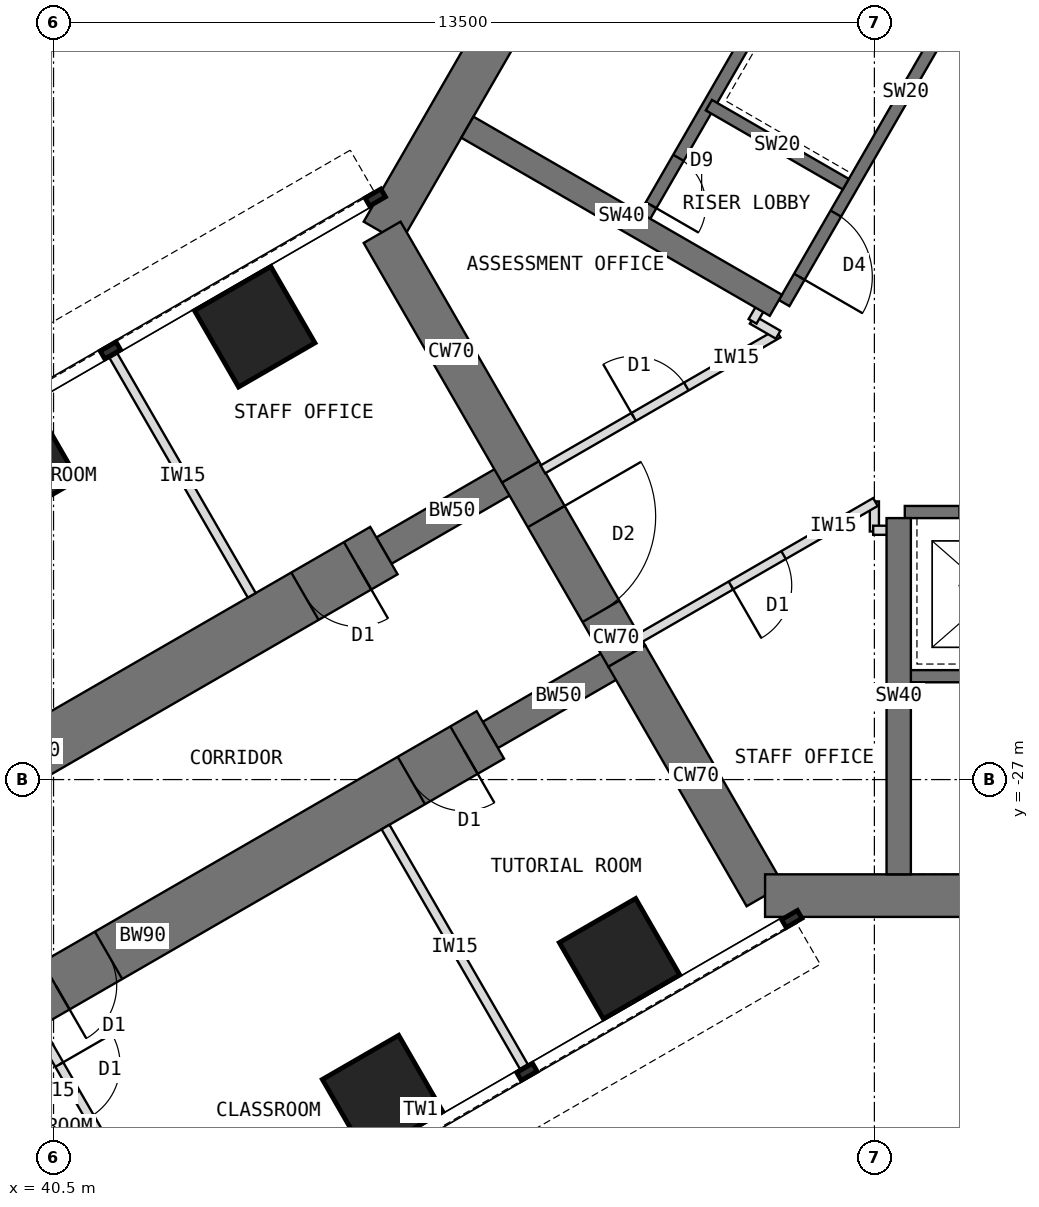
"""IFC4 building model, lengths in metres.
Left out: names, types, materials, properties, quantities, classifications, styles, units other than length and angle.
Written with IfcOpenShell. Run it as: python <this file> out.ifc"""

import sys

from ifc_helpers import new_model, si_unit, direction, frame, frame_2d, origin, origin_2d, place, context, subcontext, project, spatial, rectangle, extrude, element, fill, save


model = new_model("IFC4")
c1 = context("Model", 3, precision=1e-05, world=origin(), true_north=direction((0.0, 1.0)))
c2 = subcontext(c1, "Body", "Model", "MODEL_VIEW")
j1 = project(units=[si_unit("LENGTHUNIT", "METRE"), si_unit("PLANEANGLEUNIT", "RADIAN")], contexts=[c1])
p1 = place(None, origin())
s1 = spatial("IfcSite", under=j1, at=p1, CompositionType="ELEMENT")
p2 = place(p1, origin())
s2 = spatial("IfcBuilding", under=s1, at=p2, CompositionType="ELEMENT")
p3 = place(p2, frame((0.0, 0.0, 52.5)))
s3 = spatial("IfcBuildingStorey", under=s2, at=p3, CompositionType="ELEMENT", Elevation=52.5)
p4 = place(p3, frame((52.202, -7.092, 0.0), z_axis=(0.0, 0.0, 1.0), x_axis=(-0.500005998175, -0.866021940709, 0.0)))
e1 = element("IfcWall", 1, at=p4, inside=s3, PredefinedType="SHEAR", context=c2, shape_type="SweptSolid", body=[
    extrude(rectangle(XDim=12.596, YDim=0.7, at=frame_2d((6.298, 0.0))), origin(), (0.0, 0.0, 1.0), 4.0),
])
p5 = place(p3, frame((45.904, -18.0, 0.0), z_axis=(0.0, 0.0, 1.0), x_axis=(0.500024481964, -0.866011268655, 0.0)))
e2 = element("IfcWall", 2, at=p5, inside=s3, PredefinedType="SHEAR", context=c2, shape_type="SweptSolid", body=[
    extrude(rectangle(XDim=4.548, YDim=0.7, at=frame_2d((2.274, 0.0))), origin(), (0.0, 0.0, 1.0), 4.0),
])
p6 = place(p3, frame((48.178, -21.939, 0.0), z_axis=(0.0, 0.0, 1.0), x_axis=(0.500010275428, -0.866019471182, 0.0)))
e3 = element("IfcWall", 3, at=p6, inside=s3, PredefinedType="SHEAR", context=c2, shape_type="SweptSolid", body=[
    extrude(rectangle(XDim=3.5, YDim=0.7, at=frame_2d((1.75, 0.0))), origin(), (0.0, 0.0, 1.0), 4.0),
])
p7 = place(p6, frame((0.85, 0.0, 0.0)))
e4 = element("IfcOpeningElement", 4, at=p7, cuts=e3, PredefinedType="OPENING", context=c2, shape_type="SweptSolid", body=[
    extrude(rectangle(XDim=1.8, YDim=2.1, at=frame_2d((0.9, 1.05))), frame((0.0, 0.36, 0.0), z_axis=(0.0, -1.0, 0.0), x_axis=(1.0, 0.0, 0.0)), (0.0, 0.0, 1.0), 0.72),
])
p8 = place(p3, frame((49.928, -24.97, 0.0), z_axis=(0.0, 0.0, 1.0), x_axis=(0.499984222037, -0.866034513004, 0.0)))
e5 = element("IfcWall", 5, at=p8, inside=s3, PredefinedType="SHEAR", context=c2, shape_type="SweptSolid", body=[
    extrude(rectangle(XDim=4.548, YDim=0.7, at=frame_2d((2.274, 0.0))), origin(), (0.0, 0.0, 1.0), 4.0),
])
p9 = place(p3, frame((52.202, -28.908, 0.0), z_axis=(0.0, 0.0, 1.0), x_axis=(1.0, 0.0, 0.0)))
e6 = element("IfcWall", 6, at=p9, inside=s3, PredefinedType="SHEAR", context=c2, shape_type="SweptSolid", body=[
    extrude(rectangle(XDim=12.596, YDim=0.7, at=frame_2d((6.298, 0.0))), origin(), (0.0, 0.0, 1.0), 4.0),
])
p10 = place(p3, frame((49.928, -24.97, 0.0), z_axis=(0.0, 0.0, 1.0), x_axis=(-0.866031863473, -0.499988811324, 0.0)))
e7 = element("IfcWall", 7, at=p10, inside=s3, PredefinedType="SHEAR", context=c2, shape_type="SweptSolid", body=[
    extrude(rectangle(XDim=2.592, YDim=0.5, at=frame_2d((1.296, 0.0))), origin(), (0.0, 0.0, 1.0), 4.0),
])
p11 = place(p3, frame((47.684, -26.266, 0.0), z_axis=(0.0, 0.0, 1.0), x_axis=(-0.866027579429, -0.499996231654, 0.0)))
e8 = element("IfcWall", 8, at=p11, inside=s3, PredefinedType="SHEAR", context=c2, shape_type="SweptSolid", body=[
    extrude(rectangle(XDim=13.2, YDim=0.9, at=frame_2d((6.6, 0.0))), origin(), (0.0, 0.0, 1.0), 4.0),
])
p12 = place(p11, frame((0.5, 0.0, 0.0)))
e9 = element("IfcOpeningElement", 9, at=p12, cuts=e8, PredefinedType="OPENING", context=c2, shape_type="SweptSolid", body=[
    extrude(rectangle(XDim=1.0, YDim=2.1, at=frame_2d((0.5, 1.05))), frame((0.0, 0.46, 0.0), z_axis=(0.0, -1.0, 0.0), x_axis=(1.0, 0.0, 0.0)), (0.0, 0.0, 1.0), 0.92),
])
p13 = place(p11, frame((7.25, 0.0, 0.0)))
e10 = element("IfcOpeningElement", 10, at=p13, cuts=e8, PredefinedType="OPENING", context=c2, shape_type="SweptSolid", body=[
    extrude(rectangle(XDim=1.0, YDim=2.1, at=frame_2d((0.5, 1.05))), frame((0.0, 0.46, 0.0), z_axis=(0.0, -1.0, 0.0), x_axis=(1.0, 0.0, 0.0)), (0.0, 0.0, 1.0), 0.92),
])
p14 = place(p3, frame((48.178, -21.939, 0.0), z_axis=(0.0, 0.0, 1.0), x_axis=(-0.866072649678, -0.499918158782, 0.0)))
e11 = element("IfcWall", 11, at=p14, inside=s3, PredefinedType="SHEAR", context=c2, shape_type="SweptSolid", body=[
    extrude(rectangle(XDim=2.592, YDim=0.5, at=frame_2d((1.296, 0.0))), origin(), (0.0, 0.0, 1.0), 4.0),
])
p15 = place(p3, frame((45.934, -23.234, 0.0), z_axis=(0.0, 0.0, 1.0), x_axis=(-0.866019570528, -0.500010103361, 0.0)))
e12 = element("IfcWall", 12, at=p15, inside=s3, PredefinedType="SHEAR", context=c2, shape_type="SweptSolid", body=[
    extrude(rectangle(XDim=13.2, YDim=0.9, at=frame_2d((6.6, 0.0))), origin(), (0.0, 0.0, 1.0), 4.0),
])
p16 = place(p15, frame((0.5, 0.0, 0.0)))
e13 = element("IfcOpeningElement", 13, at=p16, cuts=e12, PredefinedType="OPENING", context=c2, shape_type="SweptSolid", body=[
    extrude(rectangle(XDim=1.0, YDim=2.1, at=frame_2d((0.5, 1.05))), frame((0.0, 0.46, 0.0), z_axis=(0.0, -1.0, 0.0), x_axis=(1.0, 0.0, 0.0)), (0.0, 0.0, 1.0), 0.92),
])
p17 = place(p15, frame((7.25, 0.0, 0.0)))
e14 = element("IfcOpeningElement", 14, at=p17, cuts=e12, PredefinedType="OPENING", context=c2, shape_type="SweptSolid", body=[
    extrude(rectangle(XDim=1.0, YDim=2.1, at=frame_2d((0.5, 1.05))), frame((0.0, 0.46, 0.0), z_axis=(0.0, -1.0, 0.0), x_axis=(1.0, 0.0, 0.0)), (0.0, 0.0, 1.0), 0.92),
])
for number, where, z_axis, x_axis in (
    (15, (49.809, -29.946, 0.0), (0.0, 0.0, 1.0), (0.866, 0.5, 0.0)),
    (16, (43.809, -19.554, 0.0), (0.0, 0.0, 1.0), (0.866, 0.5, 0.0)),
    (17, (45.912, -32.196, 0.0), (0.0, 0.0, 1.0), (0.866, 0.5, 0.0)),
    (18, (39.912, -21.804, 0.0), (0.0, 0.0, 1.0), (0.866, 0.5, 0.0)),
):
    element("IfcColumn", number, at=place(p3, frame(where, z_axis=z_axis, x_axis=x_axis)), inside=s3, PredefinedType="COLUMN", context=c2, shape_type="SweptSolid", body=[
        extrude(rectangle(XDim=1.45, YDim=1.45, at=origin_2d()), origin(), (0.0, 0.0, 1.0), 4.0),
    ])
p18 = place(p3, frame((56.516, -12.236, 0.0), z_axis=(0.0, 0.0, 1.0), x_axis=(-0.49999894854, -0.866026010844, 0.0)))
e19 = element("IfcWall", 19, at=p18, inside=s3, PredefinedType="SHEAR", context=c2, shape_type="SweptSolid", body=[
    extrude(rectangle(XDim=8.0, YDim=0.2, at=frame_2d((4.0, 0.0))), origin(), (0.0, 0.0, 1.0), 4.0),
])
p19 = place(p18, frame((6.3, 0.0, 0.0)))
e20 = element("IfcOpeningElement", 20, at=p19, cuts=e19, PredefinedType="OPENING", context=c2, shape_type="SweptSolid", body=[
    extrude(rectangle(XDim=1.2, YDim=2.1, at=frame_2d((0.6, 1.05))), frame((0.0, 0.11, 0.0), z_axis=(0.0, -1.0, 0.0), x_axis=(1.0, 0.0, 0.0)), (0.0, 0.0, 1.0), 0.22),
])
p20 = place(p3, frame((53.53, -17.209, 0.0), z_axis=(0.0, 0.0, 1.0), x_axis=(-0.866062058628, 0.499936506574, 0.0)))
e21 = element("IfcWall", 21, at=p20, inside=s3, PredefinedType="SHEAR", context=c2, shape_type="SweptSolid", body=[
    extrude(rectangle(XDim=2.6, YDim=0.2, at=frame_2d((1.3, 0.0))), origin(), (0.0, 0.0, 1.0), 4.0),
])
p21 = place(p3, frame((54.178, -10.886, 0.0), z_axis=(0.0, 0.0, 1.0), x_axis=(-0.49999894854, -0.866026010844, 0.0)))
e22 = element("IfcWall", 22, at=p21, inside=s3, PredefinedType="SHEAR", context=c2, shape_type="SweptSolid", body=[
    extrude(rectangle(XDim=8.0, YDim=0.2, at=frame_2d((4.0, 0.0))), origin(), (0.0, 0.0, 1.0), 4.0),
])
p22 = place(p21, frame((6.8, 0.0, 0.0)))
e23 = element("IfcOpeningElement", 23, at=p22, cuts=e22, PredefinedType="OPENING", context=c2, shape_type="SweptSolid", body=[
    extrude(rectangle(XDim=0.9, YDim=2.1, at=frame_2d((0.45, 1.05))), frame((0.0, 0.11, 0.0), z_axis=(0.0, -1.0, 0.0), x_axis=(1.0, 0.0, 0.0)), (0.0, 0.0, 1.0), 0.22),
])
p23 = place(p3, frame((52.38, -19.201, 0.0), z_axis=(0.0, 0.0, 1.0), x_axis=(-0.866023886965, 0.500002627198, 0.0)))
e24 = element("IfcWall", 24, at=p23, inside=s3, PredefinedType="SHEAR", context=c2, shape_type="SweptSolid", body=[
    extrude(rectangle(XDim=5.858, YDim=0.4, at=frame_2d((2.929, 0.0))), origin(), (0.0, 0.0, 1.0), 4.0),
])
p24 = place(p3, frame((54.5, -22.6, 0.0), z_axis=(0.0, 0.0, 1.0), x_axis=(1.0, 0.0, 0.0)))
e25 = element("IfcWall", 25, at=p24, inside=s3, PredefinedType="SHEAR", context=c2, shape_type="SweptSolid", body=[
    extrude(rectangle(XDim=8.0, YDim=0.2, at=frame_2d((4.0, 0.0))), origin(), (0.0, 0.0, 1.0), 4.0),
])
p25 = place(p24, frame((6.3, 0.0, 0.0)))
e26 = element("IfcOpeningElement", 26, at=p25, cuts=e25, PredefinedType="OPENING", context=c2, shape_type="SweptSolid", body=[
    extrude(rectangle(XDim=1.2, YDim=2.1, at=frame_2d((0.6, 1.05))), frame((0.0, 0.11, 0.0), z_axis=(0.0, -1.0, 0.0), x_axis=(1.0, 0.0, 0.0)), (0.0, 0.0, 1.0), 0.22),
])
p26 = place(p24, frame((0.9, 0.0, 0.0)))
e27 = element("IfcOpeningElement", 27, at=p26, cuts=e25, PredefinedType="OPENING", context=c2, shape_type="SweptSolid", body=[
    extrude(rectangle(XDim=1.1, YDim=2.2, at=frame_2d((0.55, 1.1))), frame((0.0, 0.11, 0.0), z_axis=(0.0, -1.0, 0.0), x_axis=(1.0, 0.0, 0.0)), (0.0, 0.0, 1.0), 0.22),
])
p27 = place(p3, frame((54.5, -25.3, 0.0), z_axis=(0.0, 0.0, 1.0), x_axis=(1.0, 0.0, 0.0)))
e28 = element("IfcWall", 28, at=p27, inside=s3, PredefinedType="SHEAR", context=c2, shape_type="SweptSolid", body=[
    extrude(rectangle(XDim=8.0, YDim=0.2, at=frame_2d((4.0, 0.0))), origin(), (0.0, 0.0, 1.0), 4.0),
])
p28 = place(p27, frame((6.7, 0.0, 0.0)))
e29 = element("IfcOpeningElement", 29, at=p28, cuts=e28, PredefinedType="OPENING", context=c2, shape_type="SweptSolid", body=[
    extrude(rectangle(XDim=1.1, YDim=2.1, at=frame_2d((0.55, 1.05))), frame((0.0, 0.11, 0.0), z_axis=(0.0, -1.0, 0.0), x_axis=(1.0, 0.0, 0.0)), (0.0, 0.0, 1.0), 0.22),
])
p29 = place(p3, frame((54.4, -22.7, 0.0), z_axis=(0.0, 0.0, 1.0), x_axis=(0.0, -1.0, 0.0)))
e30 = element("IfcWall", 30, at=p29, inside=s3, PredefinedType="SHEAR", context=c2, shape_type="SweptSolid", body=[
    extrude(rectangle(XDim=5.858, YDim=0.4, at=frame_2d((2.929, 0.0))), origin(), (0.0, 0.0, 1.0), 4.0),
])
p30 = place(p3, frame((45.96, -27.78, 0.0), z_axis=(0.0, 0.0, 1.0), x_axis=(0.499982560684, -0.866035472144, 0.0)))
e31 = element("IfcWall", 31, at=p30, inside=s3, PredefinedType="PARTITIONING", context=c2, shape_type="SweptSolid", body=[
    extrude(rectangle(XDim=4.55, YDim=0.15, at=frame_2d((2.275, 0.0))), origin(), (0.0, 0.0, 1.0), 3.8),
])
p31 = place(p3, frame((40.244, -31.08, 0.0), z_axis=(0.0, 0.0, 1.0), x_axis=(0.500001309137, -0.866024647952, 0.0)))
e32 = element("IfcWall", 32, at=p31, inside=s3, PredefinedType="PARTITIONING", context=c2, shape_type="SweptSolid", body=[
    extrude(rectangle(XDim=2.4, YDim=0.15, at=frame_2d((1.2, 0.0))), origin(), (0.0, 0.0, 1.0), 3.8),
])
p32 = place(p31, frame((0.7, 0.0, 0.0)))
e33 = element("IfcOpeningElement", 33, at=p32, cuts=e32, PredefinedType="OPENING", context=c2, shape_type="SweptSolid", body=[
    extrude(rectangle(XDim=1.0, YDim=2.1, at=frame_2d((0.5, 1.05))), frame((0.0, 0.085, 0.0), z_axis=(0.0, -1.0, 0.0), x_axis=(1.0, 0.0, 0.0)), (0.0, 0.0, 1.0), 0.17),
])
p33 = place(p3, frame((43.76, -23.97, 0.0), z_axis=(0.0, 0.0, 1.0), x_axis=(-0.499982560684, 0.866035472144, 0.0)))
e34 = element("IfcWall", 34, at=p33, inside=s3, PredefinedType="PARTITIONING", context=c2, shape_type="SweptSolid", body=[
    extrude(rectangle(XDim=4.55, YDim=0.15, at=frame_2d((2.275, 0.0))), origin(), (0.0, 0.0, 1.0), 3.8),
])
p34 = place(p3, frame((54.0, -22.92, 0.0), z_axis=(0.0, 0.0, 1.0), x_axis=(0.0, 1.0, 0.0)))
e35 = element("IfcWall", 35, at=p34, inside=s3, PredefinedType="PARTITIONING", context=c2, shape_type="SweptSolid", body=[
    extrude(rectangle(XDim=0.494, YDim=0.15, at=frame_2d((0.247, 0.0))), origin(), (0.0, 0.0, 1.0), 3.8),
])
p35 = place(p3, frame((54.017, -22.436, 0.0), z_axis=(0.0, 0.0, 1.0), x_axis=(-0.866015446554, -0.500017246033, 0.0)))
e36 = element("IfcWall", 36, at=p35, inside=s3, PredefinedType="PARTITIONING", context=c2, shape_type="SweptSolid", body=[
    extrude(rectangle(XDim=4.469, YDim=0.15, at=frame_2d((2.234, 0.0))), origin(), (0.0, 0.0, 1.0), 3.8),
])
p36 = place(p35, frame((1.744, 0.0, 0.0)))
e37 = element("IfcOpeningElement", 37, at=p36, cuts=e36, PredefinedType="OPENING", context=c2, shape_type="SweptSolid", body=[
    extrude(rectangle(XDim=1.0, YDim=2.1, at=frame_2d((0.5, 1.05))), frame((0.0, 0.085, 0.0), z_axis=(0.0, -1.0, 0.0), x_axis=(1.0, 0.0, 0.0)), (0.0, 0.0, 1.0), 0.17),
])
p37 = place(p3, frame((48.548, -21.898, 0.0), z_axis=(0.0, 0.0, 1.0), x_axis=(0.866025445582, 0.499999927604, 0.0)))
e38 = element("IfcWall", 38, at=p37, inside=s3, PredefinedType="PARTITIONING", context=c2, shape_type="SweptSolid", body=[
    extrude(rectangle(XDim=4.468, YDim=0.15, at=frame_2d((2.234, 0.0))), origin(), (0.0, 0.0, 1.0), 3.8),
])
p38 = place(p37, frame((1.724, 0.0, 0.0)))
e39 = element("IfcOpeningElement", 39, at=p38, cuts=e38, PredefinedType="OPENING", context=c2, shape_type="SweptSolid", body=[
    extrude(rectangle(XDim=1.0, YDim=2.1, at=frame_2d((0.5, 1.05))), frame((0.0, 0.085, 0.0), z_axis=(0.0, -1.0, 0.0), x_axis=(1.0, 0.0, 0.0)), (0.0, 0.0, 1.0), 0.17),
])
p39 = place(p3, frame((52.417, -19.684, 0.0), z_axis=(0.0, 0.0, 1.0), x_axis=(-0.865831790172, 0.50033519877, 0.0)))
e40 = element("IfcWall", 40, at=p39, inside=s3, PredefinedType="PARTITIONING", context=c2, shape_type="SweptSolid", body=[
    extrude(rectangle(XDim=0.494, YDim=0.15, at=frame_2d((0.247, 0.0))), origin(), (0.0, 0.0, 1.0), 3.8),
])
for number, where, z_axis, x_axis in (
    (41, (51.997, -19.464, 0.0), (0.0, 0.0, 1.0), (0.5, 0.866, 0.0)),
    (42, (54.41, -22.9, 0.0), (0.0, 0.0, 1.0), (-1.0, 0.0, 0.0)),
):
    element("IfcWall", number, at=place(p3, frame(where, z_axis=z_axis, x_axis=x_axis)), inside=s3, PredefinedType="PARTITIONING", context=c2, shape_type="SweptSolid", body=[
        extrude(rectangle(XDim=0.43, YDim=0.15, at=frame_2d((0.215, 0.0))), origin(), (0.0, 0.0, 1.0), 3.8),
    ])
p40 = place(p19, origin())
e43 = element("IfcDoor", 43, at=p40, inside=s3, OperationType="SINGLE_SWING_RIGHT", PredefinedType="DOOR", context=c2, shape_type="SweptSolid", body=[
    extrude(rectangle(XDim=1.2, YDim=2.1, at=frame_2d((0.6, 1.05))), frame((0.0, 0.025, 0.0), z_axis=(0.0, -1.0, 0.0), x_axis=(1.0, 0.0, 0.0)), (0.0, 0.0, 1.0), 0.05),
])
fill(e20, e43)
p41 = place(p22, origin())
e44 = element("IfcDoor", 44, at=p41, inside=s3, OperationType="SINGLE_SWING_RIGHT", PredefinedType="DOOR", context=c2, shape_type="SweptSolid", body=[
    extrude(rectangle(XDim=0.9, YDim=2.1, at=frame_2d((0.45, 1.05))), frame((0.0, 0.025, 0.0), z_axis=(0.0, -1.0, 0.0), x_axis=(1.0, 0.0, 0.0)), (0.0, 0.0, 1.0), 0.05),
])
fill(e23, e44)
p42 = place(p7, origin())
e45 = element("IfcDoor", 45, at=p42, inside=s3, OperationType="DOUBLE_DOOR_DOUBLE_SWING", PredefinedType="DOOR", context=c2, shape_type="SweptSolid", body=[
    extrude(rectangle(XDim=1.72, YDim=2.06, at=frame_2d((0.9, 1.03))), frame((0.0, 0.025, 0.0), z_axis=(0.0, -1.0, 0.0), x_axis=(1.0, 0.0, 0.0)), (0.0, 0.0, 1.0), 0.05),
    extrude(rectangle(XDim=0.04, YDim=2.1, at=frame_2d((0.02, 1.05))), frame((0.0, 0.35, 0.0), z_axis=(0.0, -1.0, 0.0), x_axis=(1.0, 0.0, 0.0)), (0.0, 0.0, 1.0), 0.699),
    extrude(rectangle(XDim=0.04, YDim=2.1, at=frame_2d((1.78, 1.05))), frame((0.0, 0.35, 0.0), z_axis=(0.0, -1.0, 0.0), x_axis=(1.0, 0.0, 0.0)), (0.0, 0.0, 1.0), 0.699),
    extrude(rectangle(XDim=1.72, YDim=0.04, at=frame_2d((0.9, 2.08))), frame((0.0, 0.35, 0.0), z_axis=(0.0, -1.0, 0.0), x_axis=(1.0, 0.0, 0.0)), (0.0, 0.0, 1.0), 0.699),
])
fill(e4, e45)
p43 = place(p32, origin())
e46 = element("IfcDoor", 46, at=p43, inside=s3, OperationType="SINGLE_SWING_LEFT", PredefinedType="DOOR", context=c2, shape_type="SweptSolid", body=[
    extrude(rectangle(XDim=1.0, YDim=2.1, at=frame_2d((0.5, 1.05))), frame((0.0, 0.025, 0.0), z_axis=(0.0, -1.0, 0.0), x_axis=(1.0, 0.0, 0.0)), (0.0, 0.0, 1.0), 0.05),
])
fill(e33, e46)
p44 = place(p38, origin())
e47 = element("IfcDoor", 47, at=p44, inside=s3, OperationType="SINGLE_SWING_LEFT", PredefinedType="DOOR", context=c2, shape_type="SweptSolid", body=[
    extrude(rectangle(XDim=1.0, YDim=2.1, at=frame_2d((0.5, 1.05))), frame((0.0, 0.025, 0.0), z_axis=(0.0, -1.0, 0.0), x_axis=(1.0, 0.0, 0.0)), (0.0, 0.0, 1.0), 0.05),
])
fill(e39, e47)
p45 = place(p36, origin())
e48 = element("IfcDoor", 48, at=p45, inside=s3, OperationType="SINGLE_SWING_RIGHT", PredefinedType="DOOR", context=c2, shape_type="SweptSolid", body=[
    extrude(rectangle(XDim=1.0, YDim=2.1, at=frame_2d((0.5, 1.05))), frame((0.0, 0.025, 0.0), z_axis=(0.0, -1.0, 0.0), x_axis=(1.0, 0.0, 0.0)), (0.0, 0.0, 1.0), 0.05),
])
fill(e37, e48)
p46 = place(p12, origin())
e49 = element("IfcDoor", 49, at=p46, inside=s3, OperationType="SINGLE_SWING_LEFT", PredefinedType="DOOR", context=c2, shape_type="SweptSolid", body=[
    extrude(rectangle(XDim=0.92, YDim=2.06, at=frame_2d((0.5, 1.03))), frame((0.0, 0.025, 0.0), z_axis=(0.0, -1.0, 0.0), x_axis=(1.0, 0.0, 0.0)), (0.0, 0.0, 1.0), 0.05),
    extrude(rectangle(XDim=0.04, YDim=2.1, at=frame_2d((0.02, 1.05))), frame((0.0, 0.45, 0.0), z_axis=(0.0, -1.0, 0.0), x_axis=(1.0, 0.0, 0.0)), (0.0, 0.0, 1.0), 0.899),
    extrude(rectangle(XDim=0.04, YDim=2.1, at=frame_2d((0.98, 1.05))), frame((0.0, 0.45, 0.0), z_axis=(0.0, -1.0, 0.0), x_axis=(1.0, 0.0, 0.0)), (0.0, 0.0, 1.0), 0.899),
    extrude(rectangle(XDim=0.92, YDim=0.04, at=frame_2d((0.5, 2.08))), frame((0.0, 0.45, 0.0), z_axis=(0.0, -1.0, 0.0), x_axis=(1.0, 0.0, 0.0)), (0.0, 0.0, 1.0), 0.899),
])
fill(e9, e49)
p47 = place(p13, origin())
e50 = element("IfcDoor", 50, at=p47, inside=s3, OperationType="SINGLE_SWING_RIGHT", PredefinedType="DOOR", context=c2, shape_type="SweptSolid", body=[
    extrude(rectangle(XDim=0.92, YDim=2.06, at=frame_2d((0.5, 1.03))), frame((0.0, 0.025, 0.0), z_axis=(0.0, -1.0, 0.0), x_axis=(1.0, 0.0, 0.0)), (0.0, 0.0, 1.0), 0.05),
    extrude(rectangle(XDim=0.04, YDim=2.1, at=frame_2d((0.02, 1.05))), frame((0.0, 0.45, 0.0), z_axis=(0.0, -1.0, 0.0), x_axis=(1.0, 0.0, 0.0)), (0.0, 0.0, 1.0), 0.899),
    extrude(rectangle(XDim=0.04, YDim=2.1, at=frame_2d((0.98, 1.05))), frame((0.0, 0.45, 0.0), z_axis=(0.0, -1.0, 0.0), x_axis=(1.0, 0.0, 0.0)), (0.0, 0.0, 1.0), 0.899),
    extrude(rectangle(XDim=0.92, YDim=0.04, at=frame_2d((0.5, 2.08))), frame((0.0, 0.45, 0.0), z_axis=(0.0, -1.0, 0.0), x_axis=(1.0, 0.0, 0.0)), (0.0, 0.0, 1.0), 0.899),
])
fill(e10, e50)
p48 = place(p16, origin())
e51 = element("IfcDoor", 51, at=p48, inside=s3, OperationType="SINGLE_SWING_LEFT", PredefinedType="DOOR", context=c2, shape_type="SweptSolid", body=[
    extrude(rectangle(XDim=0.92, YDim=2.06, at=frame_2d((0.5, 1.03))), frame((0.0, 0.025, 0.0), z_axis=(0.0, -1.0, 0.0), x_axis=(1.0, 0.0, 0.0)), (0.0, 0.0, 1.0), 0.05),
    extrude(rectangle(XDim=0.04, YDim=2.1, at=frame_2d((0.02, 1.05))), frame((0.0, 0.45, 0.0), z_axis=(0.0, -1.0, 0.0), x_axis=(1.0, 0.0, 0.0)), (0.0, 0.0, 1.0), 0.899),
    extrude(rectangle(XDim=0.04, YDim=2.1, at=frame_2d((0.98, 1.05))), frame((0.0, 0.45, 0.0), z_axis=(0.0, -1.0, 0.0), x_axis=(1.0, 0.0, 0.0)), (0.0, 0.0, 1.0), 0.899),
    extrude(rectangle(XDim=0.92, YDim=0.04, at=frame_2d((0.5, 2.08))), frame((0.0, 0.45, 0.0), z_axis=(0.0, -1.0, 0.0), x_axis=(1.0, 0.0, 0.0)), (0.0, 0.0, 1.0), 0.899),
])
fill(e13, e51)
save(model, sys.argv[1])
